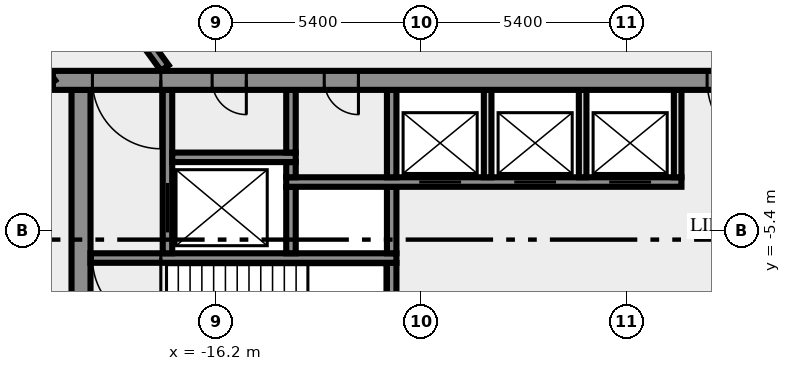
"""IFC4 building model, lengths in metres.
Left out: names, types, materials, properties, quantities, classifications, styles, units other than length and angle.
Written with IfcOpenShell. Run it as: python <this file> out.ifc"""

import sys

from ifc_helpers import new_model, si_unit, direction, frame, frame_2d, origin, place, context, subcontext, project, spatial, rectangle, extrude, element, fill, save


model = new_model("IFC4")
c1 = context("Model", 3, precision=1e-05, world=origin(), true_north=direction((0.0, 1.0)))
c2 = subcontext(c1, "Body", "Model", "MODEL_VIEW")
j1 = project(units=[si_unit("LENGTHUNIT", "METRE"), si_unit("PLANEANGLEUNIT", "RADIAN")], contexts=[c1])
p1 = place(None, origin())
s1 = spatial("IfcSite", under=j1, at=p1, CompositionType="ELEMENT")
p2 = place(p1, origin())
s2 = spatial("IfcBuilding", under=s1, at=p2, CompositionType="ELEMENT")
p3 = place(p2, frame((0.0, 0.0, 85.0)))
s3 = spatial("IfcBuildingStorey", under=s2, at=p3, CompositionType="ELEMENT", Elevation=85.0)
p4 = place(p3, frame((-19.75, -10.5, 0.0), z_axis=(0.0, 0.0, 1.0), x_axis=(0.0, 1.0, 0.0)))
e1 = element("IfcWall", 1, at=p4, inside=s3, PredefinedType="SHEAR", context=c2, shape_type="SweptSolid", body=[
    extrude(rectangle(XDim=8.8, YDim=0.5, at=frame_2d((4.4, 0.0))), origin(), (0.0, 0.0, 1.0), 3.65),
])
p5 = place(p3, frame((-11.575, -7.25, 0.0), z_axis=(0.0, 0.0, 1.0), x_axis=(0.0, 1.0, 0.0)))
e2 = element("IfcWall", 2, at=p5, inside=s3, PredefinedType="SHEAR", context=c2, shape_type="SweptSolid", body=[
    extrude(rectangle(XDim=1.0, YDim=0.25, at=frame_2d((0.5, 0.0))), origin(), (0.0, 0.0, 1.0), 3.65),
])
p6 = place(p3, frame((-11.45, -6.125, 0.0), z_axis=(0.0, 0.0, 1.0), x_axis=(-1.0, 0.0, 0.0)))
e3 = element("IfcWall", 3, at=p6, inside=s3, PredefinedType="SHEAR", context=c2, shape_type="SweptSolid", body=[
    extrude(rectangle(XDim=8.05, YDim=0.25, at=frame_2d((4.025, 0.0))), origin(), (0.0, 0.0, 1.0), 3.65),
])
p7 = place(p6, frame((6.2, 0.0, 0.0)))
e4 = element("IfcOpeningElement", 4, at=p7, cuts=e3, PredefinedType="OPENING", context=c2, shape_type="SweptSolid", body=[
    extrude(rectangle(XDim=1.8, YDim=2.1, at=frame_2d((0.9, 1.05))), frame((0.0, 0.135, 0.0), z_axis=(0.0, -1.0, 0.0), x_axis=(1.0, 0.0, 0.0)), (0.0, 0.0, 1.0), 0.27),
])
p8 = place(p3, frame((-17.475, -6.0, 0.0), z_axis=(0.0, 0.0, 1.0), x_axis=(0.0, 1.0, 0.0)))
e5 = element("IfcWall", 5, at=p8, inside=s3, PredefinedType="SHEAR", context=c2, shape_type="SweptSolid", body=[
    extrude(rectangle(XDim=4.3, YDim=0.25, at=frame_2d((2.15, 0.0))), origin(), (0.0, 0.0, 1.0), 3.65),
])
p9 = place(p8, frame((0.55, 0.0, 0.0)))
e6 = element("IfcOpeningElement", 6, at=p9, cuts=e5, PredefinedType="OPENING", context=c2, shape_type="SweptSolid", body=[
    extrude(rectangle(XDim=1.3, YDim=2.1, at=frame_2d((0.65, 1.05))), frame((0.0, 0.135, 0.0), z_axis=(0.0, -1.0, 0.0), x_axis=(1.0, 0.0, 0.0)), (0.0, 0.0, 1.0), 0.27),
])
for number, where, z_axis, x_axis in (
    (7, (-14.225, -6.0, 0.0), (0.0, 0.0, 1.0), (0.0, 1.0, 0.0)),
    (8, (-11.575, -6.0, 0.0), (0.0, 0.0, 1.0), (0.0, 1.0, 0.0)),
):
    element("IfcWall", number, at=place(p3, frame(where, z_axis=z_axis, x_axis=x_axis)), inside=s3, PredefinedType="SHEAR", context=c2, shape_type="SweptSolid", body=[
        extrude(rectangle(XDim=1.75, YDim=0.25, at=frame_2d((0.875, 0.0))), origin(), (0.0, 0.0, 1.0), 3.65),
    ])
p10 = place(p3, frame((-14.35, -4.125, 0.0), z_axis=(0.0, 0.0, 1.0), x_axis=(1.0, 0.0, 0.0)))
e9 = element("IfcWall", 9, at=p10, inside=s3, PredefinedType="SHEAR", context=c2, shape_type="SweptSolid", body=[
    extrude(rectangle(XDim=10.4, YDim=0.25, at=frame_2d((5.2, 0.0))), origin(), (0.0, 0.0, 1.0), 3.65),
])
p11 = place(p10, frame((3.5, 0.0, 0.0)))
e10 = element("IfcOpeningElement", 10, at=p11, cuts=e9, PredefinedType="OPENING", context=c2, shape_type="SweptSolid", body=[
    extrude(rectangle(XDim=1.1, YDim=2.1, at=frame_2d((0.55, 1.05))), frame((0.0, 0.135, 0.0), z_axis=(0.0, -1.0, 0.0), x_axis=(1.0, 0.0, 0.0)), (0.0, 0.0, 1.0), 0.27),
])
p12 = place(p10, frame((6.0, 0.0, 0.0)))
e11 = element("IfcOpeningElement", 11, at=p12, cuts=e9, PredefinedType="OPENING", context=c2, shape_type="SweptSolid", body=[
    extrude(rectangle(XDim=1.1, YDim=2.1, at=frame_2d((0.55, 1.05))), frame((0.0, 0.135, 0.0), z_axis=(0.0, -1.0, 0.0), x_axis=(1.0, 0.0, 0.0)), (0.0, 0.0, 1.0), 0.27),
])
p13 = place(p10, frame((8.5, 0.0, 0.0)))
e12 = element("IfcOpeningElement", 12, at=p13, cuts=e9, PredefinedType="OPENING", context=c2, shape_type="SweptSolid", body=[
    extrude(rectangle(XDim=1.1, YDim=2.1, at=frame_2d((0.55, 1.05))), frame((0.0, 0.135, 0.0), z_axis=(0.0, -1.0, 0.0), x_axis=(1.0, 0.0, 0.0)), (0.0, 0.0, 1.0), 0.27),
])
p14 = place(p3, frame((-14.225, -4.0, 0.0), z_axis=(0.0, 0.0, 1.0), x_axis=(0.0, 1.0, 0.0)))
e13 = element("IfcWall", 13, at=p14, inside=s3, PredefinedType="SHEAR", context=c2, shape_type="SweptSolid", body=[
    extrude(rectangle(XDim=0.4, YDim=0.25, at=frame_2d((0.2, 0.0))), origin(), (0.0, 0.0, 1.0), 3.65),
])
p15 = place(p3, frame((-11.575, -4.0, 0.0), z_axis=(0.0, 0.0, 1.0), x_axis=(0.0, 1.0, 0.0)))
e14 = element("IfcWall", 14, at=p15, inside=s3, PredefinedType="SHEAR", context=c2, shape_type="SweptSolid", body=[
    extrude(rectangle(XDim=2.3, YDim=0.25, at=frame_2d((1.15, 0.0))), origin(), (0.0, 0.0, 1.0), 3.65),
])
for number, where, z_axis, x_axis in (
    (15, (-9.05, -4.0, 0.0), (0.0, 0.0, 1.0), (0.0, 1.0, 0.0)),
    (16, (-6.55, -4.0, 0.0), (0.0, 0.0, 1.0), (0.0, 1.0, 0.0)),
    (17, (-4.05, -4.0, 0.0), (0.0, 0.0, 1.0), (0.0, 1.0, 0.0)),
):
    element("IfcWall", number, at=place(p3, frame(where, z_axis=z_axis, x_axis=x_axis)), inside=s3, PredefinedType="SOLIDWALL", context=c2, shape_type="SweptSolid", body=[
        extrude(rectangle(XDim=2.3, YDim=0.2, at=frame_2d((1.15, 0.0))), origin(), (0.0, 0.0, 1.0), 3.65),
    ])
p16 = place(p3, frame((-17.35, -3.475, 0.0), z_axis=(0.0, 0.0, 1.0), x_axis=(1.0, 0.0, 0.0)))
e18 = element("IfcWall", 18, at=p16, inside=s3, PredefinedType="SHEAR", context=c2, shape_type="SweptSolid", body=[
    extrude(rectangle(XDim=3.25, YDim=0.25, at=frame_2d((1.625, 0.0))), origin(), (0.0, 0.0, 1.0), 3.65),
])
p17 = place(p3, frame((-14.225, -3.35, 0.0), z_axis=(0.0, 0.0, 1.0), x_axis=(0.0, 1.0, 0.0)))
e19 = element("IfcWall", 19, at=p17, inside=s3, PredefinedType="SHEAR", context=c2, shape_type="SweptSolid", body=[
    extrude(rectangle(XDim=1.65, YDim=0.25, at=frame_2d((0.825, 0.0))), origin(), (0.0, 0.0, 1.0), 3.65),
])
p18 = place(p3, frame((20.49, -1.45, 0.0), z_axis=(0.0, 0.0, 1.0), x_axis=(-1.0, 0.0, 0.0)))
e20 = element("IfcWall", 20, at=p18, inside=s3, PredefinedType="SHEAR", context=c2, shape_type="SweptSolid", body=[
    extrude(rectangle(XDim=40.98, YDim=0.5, at=frame_2d((20.49, 0.0))), origin(), (0.0, 0.0, 1.0), 3.65),
])
p19 = place(p18, frame((38.14, 0.0, 0.0)))
e21 = element("IfcOpeningElement", 21, at=p19, cuts=e20, PredefinedType="OPENING", context=c2, shape_type="SweptSolid", body=[
    extrude(rectangle(XDim=1.8, YDim=2.1, at=frame_2d((0.9, 1.05))), frame((0.0, 0.26, 0.0), z_axis=(0.0, -1.0, 0.0), x_axis=(1.0, 0.0, 0.0)), (0.0, 0.0, 1.0), 0.52),
])
p20 = place(p18, frame((35.89, 0.0, 0.0)))
e22 = element("IfcOpeningElement", 22, at=p20, cuts=e20, PredefinedType="OPENING", context=c2, shape_type="SweptSolid", body=[
    extrude(rectangle(XDim=0.9, YDim=2.1, at=frame_2d((0.45, 1.05))), frame((0.0, 0.26, 0.0), z_axis=(0.0, -1.0, 0.0), x_axis=(1.0, 0.0, 0.0)), (0.0, 0.0, 1.0), 0.52),
])
p21 = place(p18, frame((32.94, 0.0, 0.0)))
e23 = element("IfcOpeningElement", 23, at=p21, cuts=e20, PredefinedType="OPENING", context=c2, shape_type="SweptSolid", body=[
    extrude(rectangle(XDim=0.9, YDim=2.1, at=frame_2d((0.45, 1.05))), frame((0.0, 0.26, 0.0), z_axis=(0.0, -1.0, 0.0), x_axis=(1.0, 0.0, 0.0)), (0.0, 0.0, 1.0), 0.52),
])
p22 = place(p18, frame((21.765, 0.0, 0.0)))
e24 = element("IfcOpeningElement", 24, at=p22, cuts=e20, PredefinedType="OPENING", context=c2, shape_type="SweptSolid", body=[
    extrude(rectangle(XDim=2.0, YDim=2.1, at=frame_2d((1.0, 1.05))), frame((0.0, 0.26, 0.0), z_axis=(0.0, -1.0, 0.0), x_axis=(1.0, 0.0, 0.0)), (0.0, 0.0, 1.0), 0.52),
])
p23 = place(p18, frame((7.14, 0.0, 0.0)))
e25 = element("IfcOpeningElement", 25, at=p23, cuts=e20, PredefinedType="OPENING", context=c2, shape_type="SweptSolid", body=[
    extrude(rectangle(XDim=0.9, YDim=2.1, at=frame_2d((0.45, 1.05))), frame((0.0, 0.26, 0.0), z_axis=(0.0, -1.0, 0.0), x_axis=(1.0, 0.0, 0.0)), (0.0, 0.0, 1.0), 0.52),
])
p24 = place(p18, frame((5.028, 0.0, 0.0)))
e26 = element("IfcOpeningElement", 26, at=p24, cuts=e20, PredefinedType="OPENING", context=c2, shape_type="SweptSolid", body=[
    extrude(rectangle(XDim=0.8, YDim=2.1, at=frame_2d((0.4, 1.05))), frame((0.0, 0.26, 0.0), z_axis=(0.0, -1.0, 0.0), x_axis=(1.0, 0.0, 0.0)), (0.0, 0.0, 1.0), 0.52),
])
p25 = place(p18, frame((3.452, 0.0, 0.0)))
e27 = element("IfcOpeningElement", 27, at=p25, cuts=e20, PredefinedType="OPENING", context=c2, shape_type="SweptSolid", body=[
    extrude(rectangle(XDim=0.8, YDim=2.1, at=frame_2d((0.4, 1.05))), frame((0.0, 0.26, 0.0), z_axis=(0.0, -1.0, 0.0), x_axis=(1.0, 0.0, 0.0)), (0.0, 0.0, 1.0), 0.52),
])
p26 = place(p18, frame((1.04, 0.0, 0.0)))
e28 = element("IfcOpeningElement", 28, at=p26, cuts=e20, PredefinedType="OPENING", context=c2, shape_type="SweptSolid", body=[
    extrude(rectangle(XDim=1.8, YDim=2.1, at=frame_2d((0.9, 1.05))), frame((0.0, 0.26, 0.0), z_axis=(0.0, -1.0, 0.0), x_axis=(1.0, 0.0, 0.0)), (0.0, 0.0, 1.0), 0.52),
])
p27 = place(p3, frame((-20.531, -1.523, 0.0), z_axis=(0.0, 0.0, 1.0), x_axis=(-0.587784522481, 0.809017524614, 0.0)))
e29 = element("IfcWall", 29, at=p27, inside=s3, PredefinedType="SOLIDWALL", context=c2, shape_type="SweptSolid", body=[
    extrude(rectangle(XDim=49.912, YDim=0.25, at=frame_2d((24.956, 0.0))), origin(), (0.0, 0.0, 1.0), 3.65),
])
p28 = place(p27, frame((0.533, 0.0, 0.0)))
e30 = element("IfcOpeningElement", 30, at=p28, cuts=e29, PredefinedType="OPENING", context=c2, shape_type="SweptSolid", body=[
    extrude(rectangle(XDim=0.9, YDim=2.1, at=frame_2d((0.45, 1.05))), frame((0.0, 0.135, 0.0), z_axis=(0.0, -1.0, 0.0), x_axis=(1.0, 0.0, 0.0)), (0.0, 0.0, 1.0), 0.27),
])
p29 = place(p27, frame((48.47, 0.0, 0.0)))
e31 = element("IfcOpeningElement", 31, at=p29, cuts=e29, PredefinedType="OPENING", context=c2, shape_type="SweptSolid", body=[
    extrude(rectangle(XDim=1.0, YDim=2.1, at=frame_2d((0.5, 1.05))), frame((0.0, 0.135, 0.0), z_axis=(0.0, -1.0, 0.0), x_axis=(1.0, 0.0, 0.0)), (0.0, 0.0, 1.0), 0.27),
])
p30 = place(p27, frame((17.365, 0.0, 0.0)))
e32 = element("IfcOpeningElement", 32, at=p30, cuts=e29, PredefinedType="OPENING", context=c2, shape_type="SweptSolid", body=[
    extrude(rectangle(XDim=1.8, YDim=2.1, at=frame_2d((0.9, 1.05))), frame((0.0, 0.135, 0.0), z_axis=(0.0, -1.0, 0.0), x_axis=(1.0, 0.0, 0.0)), (0.0, 0.0, 1.0), 0.27),
])
p31 = place(p27, frame((7.816, 0.0, 0.0)))
e33 = element("IfcOpeningElement", 33, at=p31, cuts=e29, PredefinedType="OPENING", context=c2, shape_type="SweptSolid", body=[
    extrude(rectangle(XDim=0.9, YDim=2.1, at=frame_2d((0.45, 1.05))), frame((0.0, 0.135, 0.0), z_axis=(0.0, -1.0, 0.0), x_axis=(1.0, 0.0, 0.0)), (0.0, 0.0, 1.0), 0.27),
])
p32 = place(p3, frame((-37.232, 25.972, 0.0), z_axis=(0.0, 0.0, 1.0), x_axis=(0.587786323093, -0.809016216391, 0.0)))
e34 = element("IfcWall", 34, at=p32, inside=s3, PredefinedType="SOLIDWALL", context=c2, shape_type="SweptSolid", body=[
    extrude(rectangle(XDim=33.493, YDim=0.25, at=frame_2d((16.747, 0.0))), origin(), (0.0, 0.0, 1.0), 3.65),
])
p33 = place(p32, frame((19.135, 0.0, 0.0)))
e35 = element("IfcOpeningElement", 35, at=p33, cuts=e34, PredefinedType="OPENING", context=c2, shape_type="SweptSolid", body=[
    extrude(rectangle(XDim=0.9, YDim=2.1, at=frame_2d((0.45, 1.05))), frame((0.0, 0.135, 0.0), z_axis=(0.0, -1.0, 0.0), x_axis=(1.0, 0.0, 0.0)), (0.0, 0.0, 1.0), 0.27),
])
p34 = place(p32, frame((7.137, 0.0, 0.0)))
e36 = element("IfcOpeningElement", 36, at=p34, cuts=e34, PredefinedType="OPENING", context=c2, shape_type="SweptSolid", body=[
    extrude(rectangle(XDim=1.8, YDim=2.1, at=frame_2d((0.9, 1.05))), frame((0.0, 0.135, 0.0), z_axis=(0.0, -1.0, 0.0), x_axis=(1.0, 0.0, 0.0)), (0.0, 0.0, 1.0), 0.27),
])
p35 = place(p32, frame((16.435, 0.0, 0.0)))
e37 = element("IfcOpeningElement", 37, at=p35, cuts=e34, PredefinedType="OPENING", context=c2, shape_type="SweptSolid", body=[
    extrude(rectangle(XDim=0.9, YDim=2.1, at=frame_2d((0.45, 1.05))), frame((0.0, 0.135, 0.0), z_axis=(0.0, -1.0, 0.0), x_axis=(1.0, 0.0, 0.0)), (0.0, 0.0, 1.0), 0.27),
])
p36 = place(p7, origin())
e38 = element("IfcDoor", 38, at=p36, inside=s3, OperationType="DOUBLE_DOOR_SINGLE_SWING", PredefinedType="DOOR", context=c2, shape_type="SweptSolid", body=[
    extrude(rectangle(XDim=1.8, YDim=2.1, at=frame_2d((0.9, 1.05))), frame((0.0, 0.025, 0.0), z_axis=(0.0, -1.0, 0.0), x_axis=(1.0, 0.0, 0.0)), (0.0, 0.0, 1.0), 0.05),
])
fill(e4, e38)
p37 = place(p9, origin())
e39 = element("IfcDoor", 39, at=p37, inside=s3, OperationType="DOUBLE_DOOR_SLIDING", PredefinedType="DOOR", context=c2, shape_type="SweptSolid", body=[
    extrude(rectangle(XDim=1.3, YDim=2.1, at=frame_2d((0.65, 1.05))), frame((0.0, 0.025, 0.0), z_axis=(0.0, -1.0, 0.0), x_axis=(1.0, 0.0, 0.0)), (0.0, 0.0, 1.0), 0.05),
])
fill(e6, e39)
p38 = place(p11, origin())
e40 = element("IfcDoor", 40, at=p38, inside=s3, OperationType="DOUBLE_DOOR_SLIDING", PredefinedType="DOOR", context=c2, shape_type="SweptSolid", body=[
    extrude(rectangle(XDim=1.1, YDim=2.1, at=frame_2d((0.55, 1.05))), frame((0.0, 0.025, 0.0), z_axis=(0.0, -1.0, 0.0), x_axis=(1.0, 0.0, 0.0)), (0.0, 0.0, 1.0), 0.05),
])
fill(e10, e40)
p39 = place(p12, origin())
e41 = element("IfcDoor", 41, at=p39, inside=s3, OperationType="DOUBLE_DOOR_SLIDING", PredefinedType="DOOR", context=c2, shape_type="SweptSolid", body=[
    extrude(rectangle(XDim=1.1, YDim=2.1, at=frame_2d((0.55, 1.05))), frame((0.0, 0.025, 0.0), z_axis=(0.0, -1.0, 0.0), x_axis=(1.0, 0.0, 0.0)), (0.0, 0.0, 1.0), 0.05),
])
fill(e11, e41)
p40 = place(p13, origin())
e42 = element("IfcDoor", 42, at=p40, inside=s3, OperationType="DOUBLE_DOOR_SLIDING", PredefinedType="DOOR", context=c2, shape_type="SweptSolid", body=[
    extrude(rectangle(XDim=1.1, YDim=2.1, at=frame_2d((0.55, 1.05))), frame((0.0, 0.025, 0.0), z_axis=(0.0, -1.0, 0.0), x_axis=(1.0, 0.0, 0.0)), (0.0, 0.0, 1.0), 0.05),
])
fill(e12, e42)
p41 = place(p19, origin())
e43 = element("IfcDoor", 43, at=p41, inside=s3, OperationType="DOUBLE_DOOR_SINGLE_SWING", PredefinedType="DOOR", context=c2, shape_type="SweptSolid", body=[
    extrude(rectangle(XDim=1.8, YDim=2.1, at=frame_2d((0.9, 1.05))), frame((0.0, 0.025, 0.0), z_axis=(0.0, -1.0, 0.0), x_axis=(1.0, 0.0, 0.0)), (0.0, 0.0, 1.0), 0.05),
])
fill(e21, e43)
p42 = place(p20, origin())
e44 = element("IfcDoor", 44, at=p42, inside=s3, OperationType="SINGLE_SWING_RIGHT", PredefinedType="DOOR", context=c2, shape_type="SweptSolid", body=[
    extrude(rectangle(XDim=0.9, YDim=2.1, at=frame_2d((0.45, 1.05))), frame((0.0, 0.025, 0.0), z_axis=(0.0, -1.0, 0.0), x_axis=(1.0, 0.0, 0.0)), (0.0, 0.0, 1.0), 0.05),
])
fill(e22, e44)
p43 = place(p21, origin())
e45 = element("IfcDoor", 45, at=p43, inside=s3, OperationType="SINGLE_SWING_RIGHT", PredefinedType="DOOR", context=c2, shape_type="SweptSolid", body=[
    extrude(rectangle(XDim=0.9, YDim=2.1, at=frame_2d((0.45, 1.05))), frame((0.0, 0.025, 0.0), z_axis=(0.0, -1.0, 0.0), x_axis=(1.0, 0.0, 0.0)), (0.0, 0.0, 1.0), 0.05),
])
fill(e23, e45)
p44 = place(p22, origin())
e46 = element("IfcDoor", 46, at=p44, inside=s3, OperationType="DOUBLE_DOOR_SINGLE_SWING", PredefinedType="DOOR", context=c2, shape_type="SweptSolid", body=[
    extrude(rectangle(XDim=2.0, YDim=2.1, at=frame_2d((1.0, 1.05))), frame((0.0, 0.025, 0.0), z_axis=(0.0, -1.0, 0.0), x_axis=(1.0, 0.0, 0.0)), (0.0, 0.0, 1.0), 0.05),
])
fill(e24, e46)
save(model, sys.argv[1])
